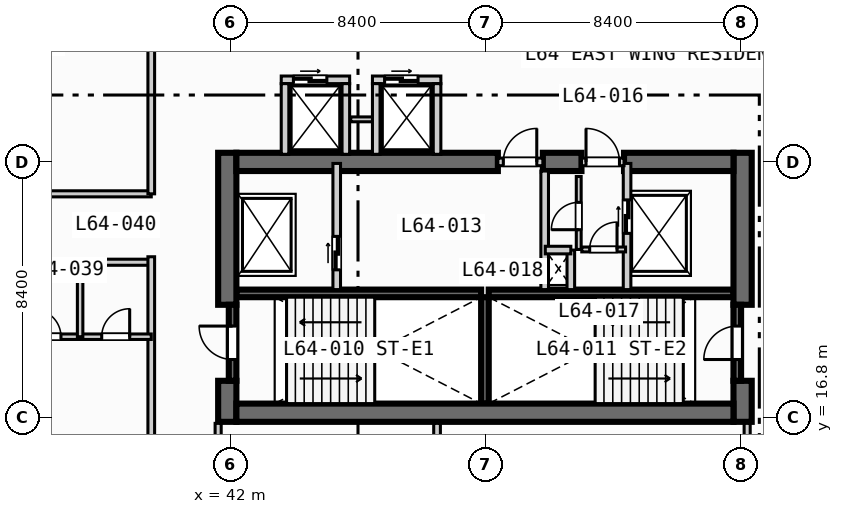
"""IFC4 building model, lengths in metres.
Left out: names, types, materials, properties, quantities, classifications, styles, units other than length and angle.
Written with IfcOpenShell. Run it as: python <this file> out.ifc"""

import sys

from ifc_helpers import new_model, si_unit, direction, frame, frame_2d, origin, place, context, subcontext, project, spatial, rectangle, extrude, element, fill, save


model = new_model("IFC4")
c1 = context("Model", 3, precision=1e-05, world=origin(), true_north=direction((0.0, 1.0)))
c2 = subcontext(c1, "Body", "Model", "MODEL_VIEW")
j1 = project(units=[si_unit("LENGTHUNIT", "METRE"), si_unit("PLANEANGLEUNIT", "RADIAN")], contexts=[c1])
p1 = place(None, origin())
s1 = spatial("IfcSite", under=j1, at=p1, CompositionType="ELEMENT")
p2 = place(p1, origin())
s2 = spatial("IfcBuilding", under=s1, at=p2, CompositionType="ELEMENT")
p3 = place(p2, frame((0.0, 0.0, 260.1)))
s3 = spatial("IfcBuildingStorey", under=s2, at=p3, CompositionType="ELEMENT", Elevation=260.1)
for number, where, z_axis, x_axis in (
    (1, (42.2, 20.875, 0.0), (0.0, 0.0, 1.0), (1.0, 0.0, 0.0)),
    (2, (50.5, 20.875, 0.0), (0.0, 0.0, 1.0), (1.0, 0.0, 0.0)),
):
    element("IfcWall", number, at=place(p3, frame(where, z_axis=z_axis, x_axis=x_axis)), inside=s3, PredefinedType="SOLIDWALL", context=c2, shape_type="SweptSolid", body=[
        extrude(rectangle(XDim=8.05, YDim=0.25, at=frame_2d((4.025, 0.0))), origin(), (0.0, 0.0, 1.0), 3.47),
    ])
p4 = place(p3, frame((50.375, 17.25, 0.0), z_axis=(0.0, 0.0, 1.0), x_axis=(0.0, 1.0, 0.0)))
e3 = element("IfcWall", 3, at=p4, inside=s3, PredefinedType="SOLIDWALL", context=c2, shape_type="SweptSolid", body=[
    extrude(rectangle(XDim=3.5, YDim=0.25, at=frame_2d((1.75, 0.0))), origin(), (0.0, 0.0, 1.0), 3.47),
])
p5 = place(p3, frame((41.9, 16.65, 0.0), z_axis=(0.0, 0.0, 1.0), x_axis=(0.0, 1.0, 0.0)))
e4 = element("IfcWall", 4, at=p5, inside=s3, PredefinedType="SHEAR", context=c2, shape_type="SweptSolid", body=[
    extrude(rectangle(XDim=1.35, YDim=0.6, at=frame_2d((0.675, 0.0))), origin(), (0.0, 0.0, 1.0), 3.47),
])
p6 = place(p3, frame((41.9, 20.5, 0.0), z_axis=(0.0, 0.0, 1.0), x_axis=(0.0, 1.0, 0.0)))
e5 = element("IfcWall", 5, at=p6, inside=s3, PredefinedType="SHEAR", context=c2, shape_type="SweptSolid", body=[
    extrude(rectangle(XDim=5.0, YDim=0.6, at=frame_2d((2.5, 0.0))), origin(), (0.0, 0.0, 1.0), 3.47),
])
p7 = place(p3, frame((58.85, 16.65, 0.0), z_axis=(0.0, 0.0, 1.0), x_axis=(0.0, 1.0, 0.0)))
e6 = element("IfcWall", 6, at=p7, inside=s3, PredefinedType="SHEAR", context=c2, shape_type="SweptSolid", body=[
    extrude(rectangle(XDim=1.35, YDim=0.6, at=frame_2d((0.675, 0.0))), origin(), (0.0, 0.0, 1.0), 3.47),
])
p8 = place(p3, frame((58.85, 20.5, 0.0), z_axis=(0.0, 0.0, 1.0), x_axis=(0.0, 1.0, 0.0)))
e7 = element("IfcWall", 7, at=p8, inside=s3, PredefinedType="SHEAR", context=c2, shape_type="SweptSolid", body=[
    extrude(rectangle(XDim=5.0, YDim=0.6, at=frame_2d((2.5, 0.0))), origin(), (0.0, 0.0, 1.0), 3.47),
])
p9 = place(p3, frame((42.2, 16.95, 0.0), z_axis=(0.0, 0.0, 1.0), x_axis=(1.0, 0.0, 0.0)))
e8 = element("IfcWall", 8, at=p9, inside=s3, PredefinedType="SHEAR", context=c2, shape_type="SweptSolid", body=[
    extrude(rectangle(XDim=16.35, YDim=0.6, at=frame_2d((8.175, 0.0))), origin(), (0.0, 0.0, 1.0), 3.47),
])
p10 = place(p3, frame((42.2, 25.2, 0.0), z_axis=(0.0, 0.0, 1.0), x_axis=(1.0, 0.0, 0.0)))
e9 = element("IfcWall", 9, at=p10, inside=s3, PredefinedType="SHEAR", context=c2, shape_type="SweptSolid", body=[
    extrude(rectangle(XDim=8.6, YDim=0.6, at=frame_2d((4.3, 0.0))), origin(), (0.0, 0.0, 1.0), 3.47),
])
p11 = place(p3, frame((52.28, 25.2, 0.0), z_axis=(0.0, 0.0, 1.0), x_axis=(1.0, 0.0, 0.0)))
e10 = element("IfcWall", 10, at=p11, inside=s3, PredefinedType="SHEAR", context=c2, shape_type="SweptSolid", body=[
    extrude(rectangle(XDim=1.27, YDim=0.6, at=frame_2d((0.635, 0.0))), origin(), (0.0, 0.0, 1.0), 3.47),
])
p12 = place(p3, frame((54.95, 25.2, 0.0), z_axis=(0.0, 0.0, 1.0), x_axis=(1.0, 0.0, 0.0)))
e11 = element("IfcWall", 11, at=p12, inside=s3, PredefinedType="SHEAR", context=c2, shape_type="SweptSolid", body=[
    extrude(rectangle(XDim=3.6, YDim=0.6, at=frame_2d((1.8, 0.0))), origin(), (0.0, 0.0, 1.0), 3.47),
])
p13 = place(p3, frame((42.075, 18.0, 0.0), z_axis=(0.0, 0.0, 1.0), x_axis=(0.0, 1.0, 0.0)))
e12 = element("IfcWall", 12, at=p13, inside=s3, PredefinedType="SOLIDWALL", context=c2, shape_type="SweptSolid", body=[
    extrude(rectangle(XDim=2.5, YDim=0.25, at=frame_2d((1.25, 0.0))), origin(), (0.0, 0.0, 1.0), 3.47),
])
p14 = place(p13, frame((0.7, 0.0, 0.0)))
e13 = element("IfcOpeningElement", 13, at=p14, cuts=e12, PredefinedType="OPENING", context=c2, shape_type="SweptSolid", body=[
    extrude(rectangle(XDim=1.1, YDim=2.15, at=frame_2d((0.55, 1.075))), frame((0.0, 0.135, 0.0), z_axis=(0.0, -1.0, 0.0), x_axis=(1.0, 0.0, 0.0)), (0.0, 0.0, 1.0), 0.27),
])
p15 = place(p3, frame((58.675, 18.0, 0.0), z_axis=(0.0, 0.0, 1.0), x_axis=(0.0, 1.0, 0.0)))
e14 = element("IfcWall", 14, at=p15, inside=s3, PredefinedType="SOLIDWALL", context=c2, shape_type="SweptSolid", body=[
    extrude(rectangle(XDim=2.5, YDim=0.25, at=frame_2d((1.25, 0.0))), origin(), (0.0, 0.0, 1.0), 3.47),
])
p16 = place(p15, frame((0.7, 0.0, 0.0)))
e15 = element("IfcOpeningElement", 15, at=p16, cuts=e14, PredefinedType="OPENING", context=c2, shape_type="SweptSolid", body=[
    extrude(rectangle(XDim=1.1, YDim=2.15, at=frame_2d((0.55, 1.075))), frame((0.0, 0.135, 0.0), z_axis=(0.0, -1.0, 0.0), x_axis=(1.0, 0.0, 0.0)), (0.0, 0.0, 1.0), 0.27),
])
p17 = place(p3, frame((45.5, 21.0, 0.0), z_axis=(0.0, 0.0, 1.0), x_axis=(0.0, 1.0, 0.0)))
e16 = element("IfcWall", 16, at=p17, inside=s3, PredefinedType="SOLIDWALL", context=c2, shape_type="SweptSolid", body=[
    extrude(rectangle(XDim=4.15, YDim=0.25, at=frame_2d((2.075, 0.0))), origin(), (0.0, 0.0, 1.0), 3.47),
])
p18 = place(p17, frame((0.65, 0.0, 0.0)))
e17 = element("IfcOpeningElement", 17, at=p18, cuts=e16, PredefinedType="OPENING", context=c2, shape_type="SweptSolid", body=[
    extrude(rectangle(XDim=1.1, YDim=2.15, at=frame_2d((0.55, 1.075))), frame((0.0, 0.135, 0.0), z_axis=(0.0, -1.0, 0.0), x_axis=(1.0, 0.0, 0.0)), (0.0, 0.0, 1.0), 0.27),
])
p19 = place(p3, frame((50.8, 25.2, 0.0), z_axis=(0.0, 0.0, 1.0), x_axis=(1.0, 0.0, 0.0)))
e18 = element("IfcWall", 18, at=p19, inside=s3, PredefinedType="SOLIDWALL", context=c2, shape_type="SweptSolid", body=[
    extrude(rectangle(XDim=1.48, YDim=0.25, at=frame_2d((0.74, 0.0))), origin(), (0.0, 0.0, 1.0), 3.47),
])
p20 = place(p19, frame((0.18, 0.0, 0.0)))
e19 = element("IfcOpeningElement", 19, at=p20, cuts=e18, PredefinedType="OPENING", context=c2, shape_type="SweptSolid", body=[
    extrude(rectangle(XDim=1.1, YDim=2.15, at=frame_2d((0.55, 1.075))), frame((0.0, 0.135, 0.0), z_axis=(0.0, -1.0, 0.0), x_axis=(1.0, 0.0, 0.0)), (0.0, 0.0, 1.0), 0.27),
])
p21 = place(p3, frame((52.34, 21.0, 0.0), z_axis=(0.0, 0.0, 1.0), x_axis=(0.0, 1.0, 0.0)))
e20 = element("IfcWall", 20, at=p21, inside=s3, PredefinedType="SOLIDWALL", context=c2, shape_type="SweptSolid", body=[
    extrude(rectangle(XDim=3.9, YDim=0.25, at=frame_2d((1.95, 0.0))), origin(), (0.0, 0.0, 1.0), 3.47),
])
p22 = place(p3, frame((55.05, 21.0, 0.0), z_axis=(0.0, 0.0, 1.0), x_axis=(0.0, 1.0, 0.0)))
e21 = element("IfcWall", 21, at=p22, inside=s3, PredefinedType="SOLIDWALL", context=c2, shape_type="SweptSolid", body=[
    extrude(rectangle(XDim=4.15, YDim=0.25, at=frame_2d((2.075, 0.0))), origin(), (0.0, 0.0, 1.0), 3.47),
])
p23 = place(p22, frame((1.85, 0.0, 0.0)))
e22 = element("IfcOpeningElement", 22, at=p23, cuts=e21, PredefinedType="OPENING", context=c2, shape_type="SweptSolid", body=[
    extrude(rectangle(XDim=1.1, YDim=2.15, at=frame_2d((0.55, 1.075))), frame((0.0, 0.135, 0.0), z_axis=(0.0, -1.0, 0.0), x_axis=(1.0, 0.0, 0.0)), (0.0, 0.0, 1.0), 0.27),
])
p24 = place(p3, frame((53.55, 25.2, 0.0), z_axis=(0.0, 0.0, 1.0), x_axis=(1.0, 0.0, 0.0)))
e23 = element("IfcWall", 23, at=p24, inside=s3, PredefinedType="SOLIDWALL", context=c2, shape_type="SweptSolid", body=[
    extrude(rectangle(XDim=1.4, YDim=0.25, at=frame_2d((0.7, 0.0))), origin(), (0.0, 0.0, 1.0), 3.47),
])
p25 = place(p24, frame((0.15, 0.0, 0.0)))
e24 = element("IfcOpeningElement", 24, at=p25, cuts=e23, PredefinedType="OPENING", context=c2, shape_type="SweptSolid", body=[
    extrude(rectangle(XDim=1.1, YDim=2.15, at=frame_2d((0.55, 1.075))), frame((0.0, 0.135, 0.0), z_axis=(0.0, -1.0, 0.0), x_axis=(1.0, 0.0, 0.0)), (0.0, 0.0, 1.0), 0.27),
])
p26 = place(p3, frame((53.2, 21.0, 0.0), z_axis=(0.0, 0.0, 1.0), x_axis=(0.0, 1.0, 0.0)))
e25 = element("IfcWall", 25, at=p26, inside=s3, PredefinedType="SOLIDWALL", context=c2, shape_type="SweptSolid", body=[
    extrude(rectangle(XDim=1.3, YDim=0.25, at=frame_2d((0.65, 0.0))), origin(), (0.0, 0.0, 1.0), 3.47),
])
p27 = place(p3, frame((52.36, 22.3, 0.0), z_axis=(0.0, 0.0, 1.0), x_axis=(1.0, 0.0, 0.0)))
e26 = element("IfcWall", 26, at=p27, inside=s3, PredefinedType="SOLIDWALL", context=c2, shape_type="SweptSolid", body=[
    extrude(rectangle(XDim=0.84, YDim=0.25, at=frame_2d((0.42, 0.0))), origin(), (0.0, 0.0, 1.0), 3.47),
])
p28 = place(p3, frame((53.56, 22.32, 0.0), z_axis=(0.0, 0.0, 1.0), x_axis=(1.0, 0.0, 0.0)))
e27 = element("IfcWall", 27, at=p28, inside=s3, PredefinedType="PARTITIONING", context=c2, shape_type="SweptSolid", body=[
    extrude(rectangle(XDim=1.44, YDim=0.16, at=frame_2d((0.72, 0.0))), origin(), (0.0, 0.0, 1.0), 3.47),
])
p29 = place(p28, frame((0.26, 0.0, 0.0)))
e28 = element("IfcOpeningElement", 28, at=p29, cuts=e27, PredefinedType="OPENING", context=c2, shape_type="SweptSolid", body=[
    extrude(rectangle(XDim=0.9, YDim=2.1, at=frame_2d((0.45, 1.05))), frame((0.0, 0.09, 0.0), z_axis=(0.0, -1.0, 0.0), x_axis=(1.0, 0.0, 0.0)), (0.0, 0.0, 1.0), 0.18),
])
p30 = place(p3, frame((53.46, 22.32, 0.0), z_axis=(0.0, 0.0, 1.0), x_axis=(0.0, 1.0, 0.0)))
e29 = element("IfcWall", 29, at=p30, inside=s3, PredefinedType="PARTITIONING", context=c2, shape_type="SweptSolid", body=[
    extrude(rectangle(XDim=2.4, YDim=0.16, at=frame_2d((1.2, 0.0))), origin(), (0.0, 0.0, 1.0), 3.47),
])
p31 = place(p30, frame((0.65, 0.0, 0.0)))
e30 = element("IfcOpeningElement", 30, at=p31, cuts=e29, PredefinedType="OPENING", context=c2, shape_type="SweptSolid", body=[
    extrude(rectangle(XDim=0.9, YDim=2.1, at=frame_2d((0.45, 1.05))), frame((0.0, 0.09, 0.0), z_axis=(0.0, -1.0, 0.0), x_axis=(1.0, 0.0, 0.0)), (0.0, 0.0, 1.0), 0.18),
])
p32 = place(p3, frame((43.675, 27.9, 0.0), z_axis=(0.0, 0.0, 1.0), x_axis=(1.0, 0.0, 0.0)))
e31 = element("IfcWall", 31, at=p32, inside=s3, PredefinedType="SOLIDWALL", context=c2, shape_type="SweptSolid", body=[
    extrude(rectangle(XDim=2.25, YDim=0.25, at=frame_2d((1.125, 0.0))), origin(), (0.0, 0.0, 1.0), 3.47),
])
p33 = place(p32, frame((0.4, 0.0, 0.0)))
e32 = element("IfcOpeningElement", 32, at=p33, cuts=e31, PredefinedType="OPENING", context=c2, shape_type="SweptSolid", body=[
    extrude(rectangle(XDim=1.1, YDim=2.15, at=frame_2d((0.55, 1.075))), frame((0.0, 0.135, 0.0), z_axis=(0.0, -1.0, 0.0), x_axis=(1.0, 0.0, 0.0)), (0.0, 0.0, 1.0), 0.27),
])
for number, where, z_axis, x_axis in (
    (33, (43.8, 25.45, 0.0), (0.0, 0.0, 1.0), (0.0, 1.0, 0.0)),
    (34, (45.8, 25.45, 0.0), (0.0, 0.0, 1.0), (0.0, 1.0, 0.0)),
):
    element("IfcWall", number, at=place(p3, frame(where, z_axis=z_axis, x_axis=x_axis)), inside=s3, PredefinedType="SOLIDWALL", context=c2, shape_type="SweptSolid", body=[
        extrude(rectangle(XDim=2.325, YDim=0.25, at=frame_2d((1.163, 0.0))), origin(), (0.0, 0.0, 1.0), 3.47),
    ])
p34 = place(p3, frame((45.96, 26.6, 0.0), z_axis=(0.0, 0.0, 1.0), x_axis=(1.0, 0.0, 0.0)))
e35 = element("IfcWall", 35, at=p34, inside=s3, PredefinedType="PARTITIONING", context=c2, shape_type="SweptSolid", body=[
    extrude(rectangle(XDim=0.88, YDim=0.16, at=frame_2d((0.44, 0.0))), origin(), (0.0, 0.0, 1.0), 3.47),
])
p35 = place(p3, frame((46.675, 27.9, 0.0), z_axis=(0.0, 0.0, 1.0), x_axis=(1.0, 0.0, 0.0)))
e36 = element("IfcWall", 36, at=p35, inside=s3, PredefinedType="SOLIDWALL", context=c2, shape_type="SweptSolid", body=[
    extrude(rectangle(XDim=2.25, YDim=0.25, at=frame_2d((1.125, 0.0))), origin(), (0.0, 0.0, 1.0), 3.47),
])
p36 = place(p35, frame((0.4, 0.0, 0.0)))
e37 = element("IfcOpeningElement", 37, at=p36, cuts=e36, PredefinedType="OPENING", context=c2, shape_type="SweptSolid", body=[
    extrude(rectangle(XDim=1.1, YDim=2.15, at=frame_2d((0.55, 1.075))), frame((0.0, 0.135, 0.0), z_axis=(0.0, -1.0, 0.0), x_axis=(1.0, 0.0, 0.0)), (0.0, 0.0, 1.0), 0.27),
])
for number, where, z_axis, x_axis in (
    (38, (46.8, 25.45, 0.0), (0.0, 0.0, 1.0), (0.0, 1.0, 0.0)),
    (39, (48.8, 25.45, 0.0), (0.0, 0.0, 1.0), (0.0, 1.0, 0.0)),
):
    element("IfcWall", number, at=place(p3, frame(where, z_axis=z_axis, x_axis=x_axis)), inside=s3, PredefinedType="SOLIDWALL", context=c2, shape_type="SweptSolid", body=[
        extrude(rectangle(XDim=2.325, YDim=0.25, at=frame_2d((1.163, 0.0))), origin(), (0.0, 0.0, 1.0), 3.47),
    ])
p37 = place(p3, frame((30.6, 24.15, 0.0), z_axis=(0.0, 0.0, 1.0), x_axis=(1.0, 0.0, 0.0)))
e40 = element("IfcWall", 40, at=p37, inside=s3, PredefinedType="PARTITIONING", context=c2, shape_type="SweptSolid", body=[
    extrude(rectangle(XDim=8.8, YDim=0.2, at=frame_2d((4.4, 0.0))), origin(), (0.0, 0.0, 1.0), 3.47),
])
p38 = place(p37, frame((3.75, 0.0, 0.0)))
e41 = element("IfcOpeningElement", 41, at=p38, cuts=e40, PredefinedType="OPENING", context=c2, shape_type="SweptSolid", body=[
    extrude(rectangle(XDim=0.92, YDim=2.1, at=frame_2d((0.46, 1.05))), frame((0.0, 0.11, 0.0), z_axis=(0.0, -1.0, 0.0), x_axis=(1.0, 0.0, 0.0)), (0.0, 0.0, 1.0), 0.22),
])
p39 = place(p3, frame((39.4, 24.15, 0.0), z_axis=(0.0, 0.0, 1.0), x_axis=(0.0, 1.0, 0.0)))
e42 = element("IfcWall", 42, at=p39, inside=s3, PredefinedType="PARTITIONING", context=c2, shape_type="SweptSolid", body=[
    extrude(rectangle(XDim=9.15, YDim=0.22, at=frame_2d((4.575, 0.0))), origin(), (0.0, 0.0, 1.0), 3.47),
])
p40 = place(p3, frame((41.6, 8.65, 0.0), z_axis=(0.0, 0.0, 1.0), x_axis=(0.0, 1.0, 0.0)))
e43 = element("IfcWall", 43, at=p40, inside=s3, PredefinedType="PARTITIONING", context=c2, shape_type="SweptSolid", body=[
    extrude(rectangle(XDim=7.95, YDim=0.2, at=frame_2d((3.975, 0.0))), origin(), (0.0, 0.0, 1.0), 3.47),
])
p41 = place(p40, frame((2.2, 0.0, 0.0)))
e44 = element("IfcOpeningElement", 44, at=p41, cuts=e43, PredefinedType="OPENING", context=c2, shape_type="SweptSolid", body=[
    extrude(rectangle(XDim=0.92, YDim=2.1, at=frame_2d((0.46, 1.05))), frame((0.0, 0.11, 0.0), z_axis=(0.0, -1.0, 0.0), x_axis=(1.0, 0.0, 0.0)), (0.0, 0.0, 1.0), 0.22),
])
p42 = place(p3, frame((59.0, 8.65, 0.0), z_axis=(0.0, 0.0, 1.0), x_axis=(0.0, 1.0, 0.0)))
e45 = element("IfcWall", 45, at=p42, inside=s3, PredefinedType="PARTITIONING", context=c2, shape_type="SweptSolid", body=[
    extrude(rectangle(XDim=7.95, YDim=0.2, at=frame_2d((3.975, 0.0))), origin(), (0.0, 0.0, 1.0), 2.931),
])
p43 = place(p42, frame((2.2, 0.0, 0.0)))
e46 = element("IfcOpeningElement", 46, at=p43, cuts=e45, PredefinedType="OPENING", context=c2, shape_type="SweptSolid", body=[
    extrude(rectangle(XDim=0.92, YDim=2.1, at=frame_2d((0.46, 1.05))), frame((0.0, 0.11, 0.0), z_axis=(0.0, -1.0, 0.0), x_axis=(1.0, 0.0, 0.0)), (0.0, 0.0, 1.0), 0.22),
])
p44 = place(p3, frame((48.8, 8.65, 0.0), z_axis=(0.0, 0.0, 1.0), x_axis=(0.0, 1.0, 0.0)))
e47 = element("IfcWall", 47, at=p44, inside=s3, PredefinedType="PARTITIONING", context=c2, shape_type="SweptSolid", body=[
    extrude(rectangle(XDim=7.95, YDim=0.22, at=frame_2d((3.975, 0.0))), origin(), (0.0, 0.0, 1.0), 3.47),
])
p45 = place(p3, frame((11.8, 21.9, 0.0), z_axis=(0.0, 0.0, 1.0), x_axis=(1.0, 0.0, 0.0)))
e48 = element("IfcWall", 48, at=p45, inside=s3, PredefinedType="PARTITIONING", context=c2, shape_type="SweptSolid", body=[
    extrude(rectangle(XDim=27.6, YDim=0.2, at=frame_2d((13.8, 0.0))), origin(), (0.0, 0.0, 1.0), 3.47),
])
p46 = place(p45, frame((7.42, 0.0, 0.0)))
e49 = element("IfcOpeningElement", 49, at=p46, cuts=e48, PredefinedType="OPENING", context=c2, shape_type="SweptSolid", body=[
    extrude(rectangle(XDim=1.0, YDim=2.15, at=frame_2d((0.5, 1.075))), frame((0.0, 0.11, 0.0), z_axis=(0.0, -1.0, 0.0), x_axis=(1.0, 0.0, 0.0)), (0.0, 0.0, 1.0), 0.22),
])
p47 = place(p45, frame((21.22, 0.0, 0.0)))
e50 = element("IfcOpeningElement", 50, at=p47, cuts=e48, PredefinedType="OPENING", context=c2, shape_type="SweptSolid", body=[
    extrude(rectangle(XDim=1.0, YDim=2.15, at=frame_2d((0.5, 1.075))), frame((0.0, 0.11, 0.0), z_axis=(0.0, -1.0, 0.0), x_axis=(1.0, 0.0, 0.0)), (0.0, 0.0, 1.0), 0.22),
])
p48 = place(p3, frame((39.4, 8.6, 0.0), z_axis=(0.0, 0.0, 1.0), x_axis=(0.0, 1.0, 0.0)))
e51 = element("IfcWall", 51, at=p48, inside=s3, PredefinedType="PARTITIONING", context=c2, shape_type="SweptSolid", body=[
    extrude(rectangle(XDim=13.48, YDim=0.22, at=frame_2d((6.74, 0.0))), origin(), (0.0, 0.0, 1.0), 3.47),
])
p49 = place(p3, frame((34.9, 19.45, 0.0), z_axis=(0.0, 0.0, 1.0), x_axis=(1.0, 0.0, 0.0)))
e52 = element("IfcWall", 52, at=p49, inside=s3, PredefinedType="PLUMBINGWALL", context=c2, shape_type="SweptSolid", body=[
    extrude(rectangle(XDim=4.5, YDim=0.18, at=frame_2d((2.25, 0.0))), origin(), (0.0, 0.0, 1.0), 3.47),
])
p50 = place(p49, frame((0.63, 0.0, 0.0)))
e53 = element("IfcOpeningElement", 53, at=p50, cuts=e52, PredefinedType="OPENING", context=c2, shape_type="SweptSolid", body=[
    extrude(rectangle(XDim=0.9, YDim=2.1, at=frame_2d((0.45, 1.05))), frame((0.0, 0.1, 0.0), z_axis=(0.0, -1.0, 0.0), x_axis=(1.0, 0.0, 0.0)), (0.0, 0.0, 1.0), 0.2),
])
p51 = place(p49, frame((2.87, 0.0, 0.0)))
e54 = element("IfcOpeningElement", 54, at=p51, cuts=e52, PredefinedType="OPENING", context=c2, shape_type="SweptSolid", body=[
    extrude(rectangle(XDim=0.92, YDim=2.1, at=frame_2d((0.46, 1.05))), frame((0.0, 0.1, 0.0), z_axis=(0.0, -1.0, 0.0), x_axis=(1.0, 0.0, 0.0)), (0.0, 0.0, 1.0), 0.2),
])
p52 = place(p3, frame((37.06, 19.45, 0.0), z_axis=(0.0, 0.0, 1.0), x_axis=(0.0, 1.0, 0.0)))
e55 = element("IfcWall", 55, at=p52, inside=s3, PredefinedType="PLUMBINGWALL", context=c2, shape_type="SweptSolid", body=[
    extrude(rectangle(XDim=2.45, YDim=0.18, at=frame_2d((1.225, 0.0))), origin(), (0.0, 0.0, 1.0), 3.47),
])
p53 = place(p14, origin())
e56 = element("IfcDoor", 56, at=p53, inside=s3, OperationType="SINGLE_SWING_RIGHT", PredefinedType="DOOR", context=c2, shape_type="SweptSolid", body=[
    extrude(rectangle(XDim=1.1, YDim=2.15, at=frame_2d((0.55, 1.075))), frame((0.0, 0.025, 0.0), z_axis=(0.0, -1.0, 0.0), x_axis=(1.0, 0.0, 0.0)), (0.0, 0.0, 1.0), 0.05),
])
fill(e13, e56)
p54 = place(p16, origin())
e57 = element("IfcDoor", 57, at=p54, inside=s3, OperationType="SINGLE_SWING_LEFT", PredefinedType="DOOR", context=c2, shape_type="SweptSolid", body=[
    extrude(rectangle(XDim=1.1, YDim=2.15, at=frame_2d((0.55, 1.075))), frame((0.0, 0.025, 0.0), z_axis=(0.0, -1.0, 0.0), x_axis=(1.0, 0.0, 0.0)), (0.0, 0.0, 1.0), 0.05),
])
fill(e15, e57)
p55 = place(p18, origin())
e58 = element("IfcDoor", 58, at=p55, inside=s3, OperationType="SLIDING_TO_LEFT", PredefinedType="DOOR", context=c2, shape_type="SweptSolid", body=[
    extrude(rectangle(XDim=1.1, YDim=2.15, at=frame_2d((0.55, 1.075))), frame((0.0, 0.025, 0.0), z_axis=(0.0, -1.0, 0.0), x_axis=(1.0, 0.0, 0.0)), (0.0, 0.0, 1.0), 0.05),
])
fill(e17, e58)
p56 = place(p20, origin())
e59 = element("IfcDoor", 59, at=p56, inside=s3, OperationType="SINGLE_SWING_RIGHT", PredefinedType="DOOR", context=c2, shape_type="SweptSolid", body=[
    extrude(rectangle(XDim=1.1, YDim=2.15, at=frame_2d((0.55, 1.075))), frame((0.0, 0.025, 0.0), z_axis=(0.0, -1.0, 0.0), x_axis=(1.0, 0.0, 0.0)), (0.0, 0.0, 1.0), 0.05),
])
fill(e19, e59)
p57 = place(p23, origin())
e60 = element("IfcDoor", 60, at=p57, inside=s3, OperationType="SLIDING_TO_LEFT", PredefinedType="DOOR", context=c2, shape_type="SweptSolid", body=[
    extrude(rectangle(XDim=1.1, YDim=2.15, at=frame_2d((0.55, 1.075))), frame((0.0, 0.025, 0.0), z_axis=(0.0, -1.0, 0.0), x_axis=(1.0, 0.0, 0.0)), (0.0, 0.0, 1.0), 0.05),
])
fill(e22, e60)
p58 = place(p25, origin())
e61 = element("IfcDoor", 61, at=p58, inside=s3, OperationType="SINGLE_SWING_LEFT", PredefinedType="DOOR", context=c2, shape_type="SweptSolid", body=[
    extrude(rectangle(XDim=1.1, YDim=2.15, at=frame_2d((0.55, 1.075))), frame((0.0, 0.025, 0.0), z_axis=(0.0, -1.0, 0.0), x_axis=(1.0, 0.0, 0.0)), (0.0, 0.0, 1.0), 0.05),
])
fill(e24, e61)
p59 = place(p29, origin())
e62 = element("IfcDoor", 62, at=p59, inside=s3, OperationType="SINGLE_SWING_RIGHT", PredefinedType="DOOR", context=c2, shape_type="SweptSolid", body=[
    extrude(rectangle(XDim=0.9, YDim=2.1, at=frame_2d((0.45, 1.05))), frame((0.0, 0.025, 0.0), z_axis=(0.0, -1.0, 0.0), x_axis=(1.0, 0.0, 0.0)), (0.0, 0.0, 1.0), 0.05),
])
fill(e28, e62)
p60 = place(p31, origin())
e63 = element("IfcDoor", 63, at=p60, inside=s3, OperationType="SINGLE_SWING_LEFT", PredefinedType="DOOR", context=c2, shape_type="SweptSolid", body=[
    extrude(rectangle(XDim=0.9, YDim=2.1, at=frame_2d((0.45, 1.05))), frame((0.0, 0.025, 0.0), z_axis=(0.0, -1.0, 0.0), x_axis=(1.0, 0.0, 0.0)), (0.0, 0.0, 1.0), 0.05),
])
fill(e30, e63)
p61 = place(p33, origin())
e64 = element("IfcDoor", 64, at=p61, inside=s3, OperationType="SLIDING_TO_LEFT", PredefinedType="DOOR", context=c2, shape_type="SweptSolid", body=[
    extrude(rectangle(XDim=1.1, YDim=2.15, at=frame_2d((0.55, 1.075))), frame((0.0, 0.025, 0.0), z_axis=(0.0, -1.0, 0.0), x_axis=(1.0, 0.0, 0.0)), (0.0, 0.0, 1.0), 0.05),
])
fill(e32, e64)
p62 = place(p36, origin())
e65 = element("IfcDoor", 65, at=p62, inside=s3, OperationType="SLIDING_TO_LEFT", PredefinedType="DOOR", context=c2, shape_type="SweptSolid", body=[
    extrude(rectangle(XDim=1.1, YDim=2.15, at=frame_2d((0.55, 1.075))), frame((0.0, 0.025, 0.0), z_axis=(0.0, -1.0, 0.0), x_axis=(1.0, 0.0, 0.0)), (0.0, 0.0, 1.0), 0.05),
])
fill(e37, e65)
p63 = place(p50, origin())
e66 = element("IfcDoor", 66, at=p63, inside=s3, OperationType="SINGLE_SWING_LEFT", PredefinedType="DOOR", context=c2, shape_type="SweptSolid", body=[
    extrude(rectangle(XDim=0.9, YDim=2.1, at=frame_2d((0.45, 1.05))), frame((0.0, 0.025, 0.0), z_axis=(0.0, -1.0, 0.0), x_axis=(1.0, 0.0, 0.0)), (0.0, 0.0, 1.0), 0.05),
])
fill(e53, e66)
p64 = place(p51, origin())
e67 = element("IfcDoor", 67, at=p64, inside=s3, OperationType="SINGLE_SWING_RIGHT", PredefinedType="DOOR", context=c2, shape_type="SweptSolid", body=[
    extrude(rectangle(XDim=0.92, YDim=2.1, at=frame_2d((0.46, 1.05))), frame((0.0, 0.025, 0.0), z_axis=(0.0, -1.0, 0.0), x_axis=(1.0, 0.0, 0.0)), (0.0, 0.0, 1.0), 0.05),
])
fill(e54, e67)
save(model, sys.argv[1])
